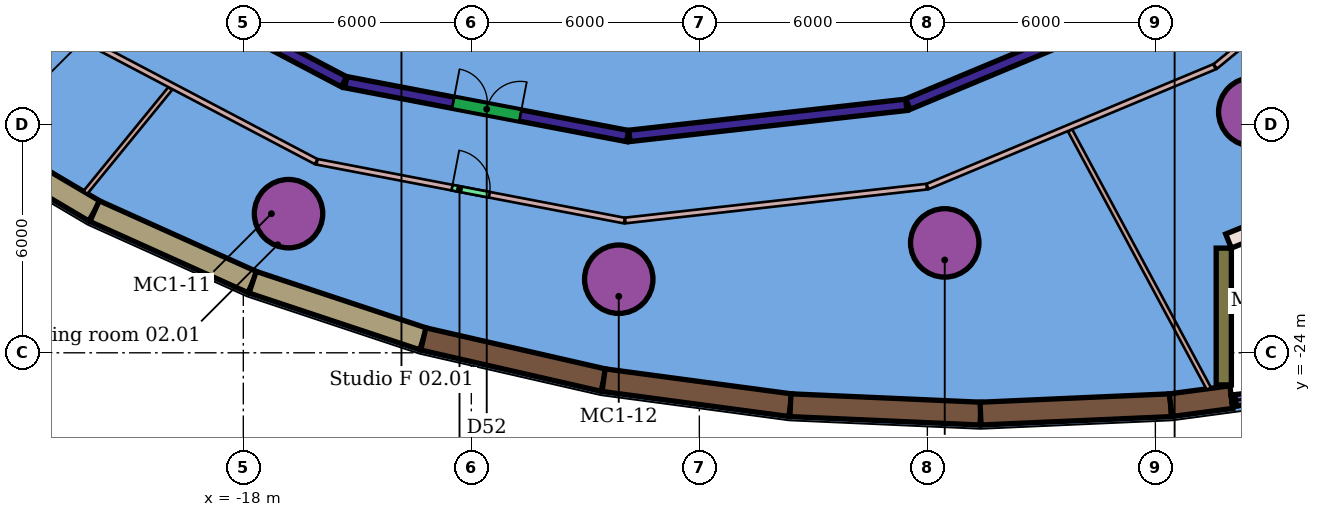
"""IFC4 building model, lengths in metres.
Left out: names, types, materials, properties, quantities, classifications, styles, units other than length and angle.
Written with IfcOpenShell. Run it as: python <this file> out.ifc"""

import sys

from ifc_helpers import new_model, si_unit, direction, frame, frame_2d, origin, origin_2d, place, context, subcontext, project, spatial, rectangle, hollow_circle, extrude, element, fill, save


model = new_model("IFC4")
c1 = context("Model", 3, precision=1e-05, world=origin(), true_north=direction((0.0, 1.0)))
c2 = subcontext(c1, "Body", "Model", "MODEL_VIEW")
j1 = project(units=[si_unit("LENGTHUNIT", "METRE"), si_unit("PLANEANGLEUNIT", "RADIAN")], contexts=[c1])
p1 = place(None, origin())
s1 = spatial("IfcSite", under=j1, at=p1, CompositionType="ELEMENT")
p2 = place(p1, origin())
s2 = spatial("IfcBuilding", under=s1, at=p2, CompositionType="ELEMENT")
p3 = place(p2, frame((0.0, 0.0, 17.0)))
s3 = spatial("IfcBuildingStorey", under=s2, at=p3, CompositionType="ELEMENT", Elevation=17.0)
for number, where, z_axis, x_axis in (
    (1, (-16.81, -20.339, 0.0), (0.0, 0.0, 1.0), (1.0, 0.0, 0.0)),
    (2, (-8.121, -22.064, 0.0), (0.0, 0.0, 1.0), (1.0, 0.0, 0.0)),
    (3, (0.458, -21.108, 0.0), (0.0, 0.0, 1.0), (1.0, 0.0, 0.0)),
    (4, (8.563, -17.66, 0.0), (0.0, 0.0, 1.0), (1.0, 0.0, 0.0)),
):
    element("IfcColumn", number, at=place(p3, frame(where, z_axis=z_axis, x_axis=x_axis)), inside=s3, PredefinedType="COLUMN", context=c2, shape_type="SweptSolid", body=[
        extrude(hollow_circle(Radius=0.9, WallThickness=0.06, at=origin_2d()), origin(), (0.0, 0.0, 1.0), 8.8),
    ])
p4 = place(p3, frame((-15.303, -16.879, 0.0), z_axis=(0.0, 0.0, 1.0), x_axis=(0.982202179266, -0.18782672612, 0.0)))
e5 = element("IfcWall", 5, at=p4, inside=s3, PredefinedType="PARTITIONING", context=c2, shape_type="SweptSolid", body=[
    extrude(rectangle(XDim=7.551, YDim=0.3, at=frame_2d((3.775, 0.0))), origin(), (0.0, 0.0, 1.0), 8.35),
])
p5 = place(p4, frame((2.875, 0.0, 0.0)))
e6 = element("IfcOpeningElement", 6, at=p5, cuts=e5, PredefinedType="OPENING", context=c2, shape_type="SweptSolid", body=[
    extrude(rectangle(XDim=1.8, YDim=2.4, at=frame_2d((0.9, 1.2))), frame((0.0, 0.16, 0.0), z_axis=(0.0, -1.0, 0.0), x_axis=(1.0, 0.0, 0.0)), (0.0, 0.0, 1.0), 0.32),
])
p6 = place(p3, frame((-22.553, -13.079, 0.0), z_axis=(0.0, 0.0, 1.0), x_axis=(0.884926027541, -0.46573160273, 0.0)))
e7 = element("IfcWall", 7, at=p6, inside=s3, PredefinedType="PARTITIONING", context=c2, shape_type="SweptSolid", body=[
    extrude(rectangle(XDim=8.142, YDim=0.3, at=frame_2d((4.071, 0.0))), origin(), (0.0, 0.0, 1.0), 8.35),
])
p7 = place(p3, frame((-0.513, -17.458, 0.0), z_axis=(0.0, 0.0, 1.0), x_axis=(0.922816768599, 0.385239161552, 0.0)))
e8 = element("IfcWall", 8, at=p7, inside=s3, PredefinedType="PARTITIONING", context=c2, shape_type="SweptSolid", body=[
    extrude(rectangle(XDim=7.058, YDim=0.3, at=frame_2d((3.529, 0.0))), origin(), (0.0, 0.0, 1.0), 8.35),
])
p8 = place(p3, frame((-7.84, -18.292, 0.0), z_axis=(0.0, 0.0, 1.0), x_axis=(0.993760088273, 0.111538724016, 0.0)))
e9 = element("IfcWall", 9, at=p8, inside=s3, PredefinedType="PARTITIONING", context=c2, shape_type="SweptSolid", body=[
    extrude(rectangle(XDim=7.333, YDim=0.3, at=frame_2d((3.666, 0.0))), origin(), (0.0, 0.0, 1.0), 8.35),
])
p9 = place(p3, frame((-22.156, -19.781, 0.0), z_axis=(0.0, 0.0, 1.0), x_axis=(0.63256707517, 0.774505581266, 0.0)))
e10 = element("IfcWall", 10, at=p9, inside=s3, PredefinedType="PARTITIONING", context=c2, shape_type="SweptSolid", body=[
    extrude(rectangle(XDim=3.53, YDim=0.125, at=frame_2d((1.765, 0.0))), origin(), (0.0, 0.0, 1.0), 8.35),
])
p10 = place(p3, frame((3.755, -18.148, 0.0), z_axis=(0.0, 0.0, 1.0), x_axis=(0.473465520946, -0.88081235259, 0.0)))
e11 = element("IfcWall", 11, at=p10, inside=s3, PredefinedType="PARTITIONING", context=c2, shape_type="SweptSolid", body=[
    extrude(rectangle(XDim=7.714, YDim=0.125, at=frame_2d((3.857, 0.0))), origin(), (0.0, 0.0, 1.0), 8.35),
])
p11 = place(p3, frame((-23.942, -14.833, 0.0), z_axis=(0.0, 0.0, 1.0), x_axis=(0.884920607371, -0.465741901326, 0.0)))
e12 = element("IfcWall", 12, at=p11, inside=s3, PredefinedType="PARTITIONING", context=c2, shape_type="SweptSolid", body=[
    extrude(rectangle(XDim=8.882, YDim=0.15, at=frame_2d((4.441, 0.0))), origin(), (0.0, 0.0, 1.0), 8.35),
])
p12 = place(p3, frame((-16.06, -18.975, 0.0), z_axis=(0.0, 0.0, 1.0), x_axis=(0.982207009241, -0.187801466976, 0.0)))
e13 = element("IfcWall", 13, at=p12, inside=s3, PredefinedType="PARTITIONING", context=c2, shape_type="SweptSolid", body=[
    extrude(rectangle(XDim=8.234, YDim=0.15, at=frame_2d((4.117, 0.0))), origin(), (0.0, 0.0, 1.0), 8.35),
])
p13 = place(p12, frame((3.617, 0.0, 0.0)))
e14 = element("IfcOpeningElement", 14, at=p13, cuts=e13, PredefinedType="OPENING", context=c2, shape_type="SweptSolid", body=[
    extrude(rectangle(XDim=1.0, YDim=2.1, at=frame_2d((0.5, 1.05))), frame((0.0, 0.085, 0.0), z_axis=(0.0, -1.0, 0.0), x_axis=(1.0, 0.0, 0.0)), (0.0, 0.0, 1.0), 0.17),
])
p14 = place(p3, frame((-7.949, -20.518, 0.0), z_axis=(0.0, 0.0, 1.0), x_axis=(0.993764533241, 0.11149911422, 0.0)))
e15 = element("IfcWall", 15, at=p14, inside=s3, PredefinedType="PARTITIONING", context=c2, shape_type="SweptSolid", body=[
    extrude(rectangle(XDim=7.981, YDim=0.15, at=frame_2d((3.991, 0.0))), origin(), (0.0, 0.0, 1.0), 8.35),
])
p15 = place(p3, frame((0.004, -19.626, 0.0), z_axis=(0.0, 0.0, 1.0), x_axis=(0.922818121352, 0.385235921097, 0.0)))
e16 = element("IfcWall", 16, at=p15, inside=s3, PredefinedType="PARTITIONING", context=c2, shape_type="SweptSolid", body=[
    extrude(rectangle(XDim=8.184, YDim=0.15, at=frame_2d((4.092, 0.0))), origin(), (0.0, 0.0, 1.0), 8.35),
])
p16 = place(p3, frame((7.577, -16.465, 0.0), z_axis=(0.0, 0.0, 1.0), x_axis=(0.772575830308, 0.634922504266, 0.0)))
e17 = element("IfcWall", 17, at=p16, inside=s3, PredefinedType="PARTITIONING", context=c2, shape_type="SweptSolid", body=[
    extrude(rectangle(XDim=8.815, YDim=0.15, at=frame_2d((4.407, 0.0))), origin(), (0.0, 0.0, 1.0), 8.35),
])
p17 = place(p16, frame((3.907, 0.0, 0.0)))
e18 = element("IfcOpeningElement", 18, at=p17, cuts=e17, PredefinedType="OPENING", context=c2, shape_type="SweptSolid", body=[
    extrude(rectangle(XDim=1.0, YDim=2.1, at=frame_2d((0.5, 1.05))), frame((0.0, 0.085, 0.0), z_axis=(0.0, -1.0, 0.0), x_axis=(1.0, 0.0, 0.0)), (0.0, 0.0, 1.0), 0.17),
])
p18 = place(p3, frame((-25.671, -18.053, 0.0), z_axis=(0.0, 0.0, 1.0), x_axis=(0.861017868942, -0.508574703818, 0.0)))
e19 = element("IfcWall", 19, at=p18, inside=s3, PredefinedType="SOLIDWALL", context=c2, shape_type="SweptSolid", body=[
    extrude(rectangle(XDim=4.363, YDim=0.6, at=frame_2d((2.181, 0.0))), origin(), (0.0, 0.0, 1.0), 8.4),
])
p19 = place(p3, frame((-21.915, -20.272, 0.0), z_axis=(0.0, 0.0, 1.0), x_axis=(0.911894462824, -0.410424766152, 0.0)))
e20 = element("IfcWall", 20, at=p19, inside=s3, PredefinedType="SOLIDWALL", context=c2, shape_type="SweptSolid", body=[
    extrude(rectangle(XDim=4.561, YDim=0.6, at=frame_2d((2.281, 0.0))), origin(), (0.0, 0.0, 1.0), 8.4),
])
p20 = place(p3, frame((-17.755, -22.144, 0.0), z_axis=(0.0, 0.0, 1.0), x_axis=(0.94901810672, -0.315221561949, 0.0)))
e21 = element("IfcWall", 21, at=p20, inside=s3, PredefinedType="SOLIDWALL", context=c2, shape_type="SweptSolid", body=[
    extrude(rectangle(XDim=4.732, YDim=0.6, at=frame_2d((2.366, 0.0))), origin(), (0.0, 0.0, 1.0), 8.4),
])
p21 = place(p3, frame((-13.264, -23.635, 0.0), z_axis=(0.0, 0.0, 1.0), x_axis=(0.97483982486, -0.222906518224, 0.0)))
e22 = element("IfcWall", 22, at=p21, inside=s3, PredefinedType="SOLIDWALL", context=c2, shape_type="SweptSolid", body=[
    extrude(rectangle(XDim=4.867, YDim=0.6, at=frame_2d((2.434, 0.0))), origin(), (0.0, 0.0, 1.0), 8.8),
])
p22 = place(p3, frame((-8.519, -24.72, 0.0), z_axis=(0.0, 0.0, 1.0), x_axis=(0.991143444913, -0.132795600853, 0.0)))
e23 = element("IfcWall", 23, at=p22, inside=s3, PredefinedType="SOLIDWALL", context=c2, shape_type="SweptSolid", body=[
    extrude(rectangle(XDim=4.96, YDim=0.6, at=frame_2d((2.48, 0.0))), origin(), (0.0, 0.0, 1.0), 8.8),
])
p23 = place(p3, frame((-3.603, -25.379, 0.0), z_axis=(0.0, 0.0, 1.0), x_axis=(0.999026213515, -0.044120570136, 0.0)))
e24 = element("IfcWall", 24, at=p23, inside=s3, PredefinedType="SOLIDWALL", context=c2, shape_type="SweptSolid", body=[
    extrude(rectangle(XDim=5.008, YDim=0.6, at=frame_2d((2.504, 0.0))), origin(), (0.0, 0.0, 1.0), 8.8),
])
p24 = place(p3, frame((1.4, -25.6, 0.0), z_axis=(0.0, 0.0, 1.0), x_axis=(0.99902630841, 0.044118421369, 0.0)))
e25 = element("IfcWall", 25, at=p24, inside=s3, PredefinedType="SOLIDWALL", context=c2, shape_type="SweptSolid", body=[
    extrude(rectangle(XDim=5.008, YDim=0.6, at=frame_2d((2.504, 0.0))), origin(), (0.0, 0.0, 1.0), 8.8),
])
p25 = place(p3, frame((6.403, -25.379, 0.0), z_axis=(0.0, 0.0, 1.0), x_axis=(0.991131029833, 0.132888230112, 0.0)))
e26 = element("IfcWall", 26, at=p25, inside=s3, PredefinedType="SOLIDWALL", context=c2, shape_type="SweptSolid", body=[
    extrude(rectangle(XDim=1.611, YDim=0.6, at=frame_2d((0.806, 0.0))), origin(), (0.0, 0.0, 1.0), 8.8),
])
p26 = place(p3, frame((8.571, -20.8, 0.0), z_axis=(0.0, 0.0, 1.0), x_axis=(-0.927141159757, -0.374712249444, 0.0)))
e27 = element("IfcWall", 27, at=p26, inside=s3, PredefinedType="SOLIDWALL", context=c2, shape_type="SweptSolid", body=[
    extrude(rectangle(XDim=0.697, YDim=0.4, at=frame_2d((0.348, 0.0))), origin(), (0.0, 0.0, 1.0), 8.4),
])
p27 = place(p3, frame((7.8, -21.246, 0.0), z_axis=(0.0, 0.0, 1.0), x_axis=(0.0, -1.0, 0.0)))
e28 = element("IfcWall", 28, at=p27, inside=s3, PredefinedType="SOLIDWALL", context=c2, shape_type="SweptSolid", body=[
    extrude(rectangle(XDim=3.599, YDim=0.4, at=frame_2d((1.8, 0.0))), origin(), (0.0, 0.0, 1.0), 8.8),
])
p28 = place(p5, origin())
e29 = element("IfcDoor", 29, at=p28, inside=s3, OperationType="DOUBLE_DOOR_SINGLE_SWING", PredefinedType="DOOR", context=c2, shape_type="SweptSolid", body=[
    extrude(rectangle(XDim=1.8, YDim=2.4, at=frame_2d((0.9, 1.2))), frame((0.0, 0.025, 0.0), z_axis=(0.0, -1.0, 0.0), x_axis=(1.0, 0.0, 0.0)), (0.0, 0.0, 1.0), 0.05),
])
fill(e6, e29)
p29 = place(p13, origin())
e30 = element("IfcDoor", 30, at=p29, inside=s3, OperationType="SINGLE_SWING_LEFT", PredefinedType="DOOR", context=c2, shape_type="SweptSolid", body=[
    extrude(rectangle(XDim=1.0, YDim=2.1, at=frame_2d((0.5, 1.05))), frame((0.0, 0.025, 0.0), z_axis=(0.0, -1.0, 0.0), x_axis=(1.0, 0.0, 0.0)), (0.0, 0.0, 1.0), 0.05),
])
fill(e14, e30)
save(model, sys.argv[1])
